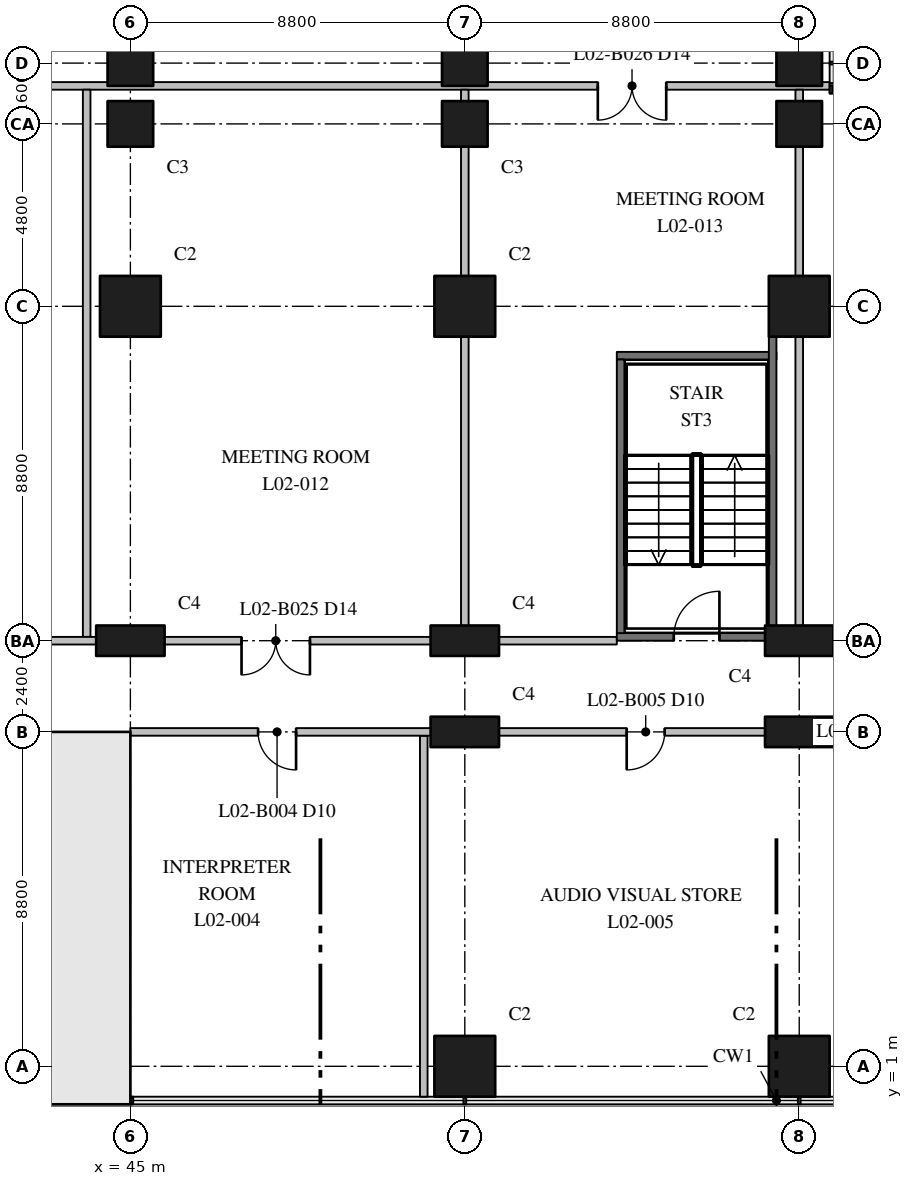
"""IFC4 building model, lengths in metres.
Left out: names, types, materials, properties, quantities, classifications, styles, units other than length and angle.
Written with IfcOpenShell. Run it as: python <this file> out.ifc"""

import sys

from ifc_helpers import new_model, si_unit, direction, frame, frame_2d, origin, origin_2d, place, context, subcontext, project, spatial, rectangle, extrude, element, fill, save


model = new_model("IFC4")
c1 = context("Model", 3, precision=1e-05, world=origin(), true_north=direction((0.0, 1.0)))
c2 = subcontext(c1, "Body", "Model", "MODEL_VIEW")
j1 = project(units=[si_unit("LENGTHUNIT", "METRE"), si_unit("PLANEANGLEUNIT", "RADIAN")], contexts=[c1])
p1 = place(None, origin())
s1 = spatial("IfcSite", under=j1, at=p1, CompositionType="ELEMENT")
p2 = place(p1, origin())
s2 = spatial("IfcBuilding", under=s1, at=p2, CompositionType="ELEMENT")
p3 = place(p2, frame((0.0, 0.0, 13.0)))
s3 = spatial("IfcBuildingStorey", under=s2, at=p3, CompositionType="ELEMENT", Elevation=13.0)
p4 = place(p3, frame((45.0, 12.2, 0.0), z_axis=(0.0, 0.0, 1.0), x_axis=(1.0, 0.0, 0.0)))
e1 = element("IfcColumn", 1, at=p4, inside=s3, PredefinedType="COLUMN", context=c2, shape_type="SweptSolid", body=[
    extrude(rectangle(XDim=1.8, YDim=0.8, at=origin_2d()), origin(), (0.0, 0.0, 1.0), 5.0),
])
p5 = place(p3, frame((45.0, 21.0, 0.0), z_axis=(0.0, 0.0, 1.0), x_axis=(1.0, 0.0, 0.0)))
e2 = element("IfcColumn", 2, at=p5, inside=s3, PredefinedType="COLUMN", context=c2, shape_type="SweptSolid", body=[
    extrude(rectangle(XDim=1.6, YDim=1.6, at=origin_2d()), origin(), (0.0, 0.0, 1.0), 5.0),
])
p6 = place(p3, frame((45.0, 25.8, 0.0), z_axis=(0.0, 0.0, 1.0), x_axis=(1.0, 0.0, 0.0)))
e3 = element("IfcColumn", 3, at=p6, inside=s3, PredefinedType="COLUMN", context=c2, shape_type="SweptSolid", body=[
    extrude(rectangle(XDim=1.2, YDim=1.2, at=origin_2d()), origin(), (0.0, 0.0, 1.0), 5.0),
])
p7 = place(p3, frame((53.8, 1.0, 0.0), z_axis=(0.0, 0.0, 1.0), x_axis=(1.0, 0.0, 0.0)))
e4 = element("IfcColumn", 4, at=p7, inside=s3, PredefinedType="COLUMN", context=c2, shape_type="SweptSolid", body=[
    extrude(rectangle(XDim=1.6, YDim=1.6, at=origin_2d()), origin(), (0.0, 0.0, 1.0), 5.0),
])
for number, where, z_axis, x_axis in (
    (5, (53.8, 9.8, 0.0), (0.0, 0.0, 1.0), (1.0, 0.0, 0.0)),
    (6, (53.8, 12.2, 0.0), (0.0, 0.0, 1.0), (1.0, 0.0, 0.0)),
):
    element("IfcColumn", number, at=place(p3, frame(where, z_axis=z_axis, x_axis=x_axis)), inside=s3, PredefinedType="COLUMN", context=c2, shape_type="SweptSolid", body=[
        extrude(rectangle(XDim=1.8, YDim=0.8, at=origin_2d()), origin(), (0.0, 0.0, 1.0), 5.0),
    ])
p8 = place(p3, frame((53.8, 21.0, 0.0), z_axis=(0.0, 0.0, 1.0), x_axis=(1.0, 0.0, 0.0)))
e7 = element("IfcColumn", 7, at=p8, inside=s3, PredefinedType="COLUMN", context=c2, shape_type="SweptSolid", body=[
    extrude(rectangle(XDim=1.6, YDim=1.6, at=origin_2d()), origin(), (0.0, 0.0, 1.0), 5.0),
])
p9 = place(p3, frame((53.8, 25.8, 0.0), z_axis=(0.0, 0.0, 1.0), x_axis=(1.0, 0.0, 0.0)))
e8 = element("IfcColumn", 8, at=p9, inside=s3, PredefinedType="COLUMN", context=c2, shape_type="SweptSolid", body=[
    extrude(rectangle(XDim=1.2, YDim=1.2, at=origin_2d()), origin(), (0.0, 0.0, 1.0), 5.0),
])
p10 = place(p3, frame((62.6, 1.0, 0.0), z_axis=(0.0, 0.0, 1.0), x_axis=(1.0, 0.0, 0.0)))
e9 = element("IfcColumn", 9, at=p10, inside=s3, PredefinedType="COLUMN", context=c2, shape_type="SweptSolid", body=[
    extrude(rectangle(XDim=1.6, YDim=1.6, at=origin_2d()), origin(), (0.0, 0.0, 1.0), 5.0),
])
for number, where, z_axis, x_axis in (
    (10, (62.6, 9.8, 0.0), (0.0, 0.0, 1.0), (1.0, 0.0, 0.0)),
    (11, (62.6, 12.2, 0.0), (0.0, 0.0, 1.0), (1.0, 0.0, 0.0)),
):
    element("IfcColumn", number, at=place(p3, frame(where, z_axis=z_axis, x_axis=x_axis)), inside=s3, PredefinedType="COLUMN", context=c2, shape_type="SweptSolid", body=[
        extrude(rectangle(XDim=1.8, YDim=0.8, at=origin_2d()), origin(), (0.0, 0.0, 1.0), 5.0),
    ])
p11 = place(p3, frame((62.6, 21.0, 0.0), z_axis=(0.0, 0.0, 1.0), x_axis=(1.0, 0.0, 0.0)))
e12 = element("IfcColumn", 12, at=p11, inside=s3, PredefinedType="COLUMN", context=c2, shape_type="SweptSolid", body=[
    extrude(rectangle(XDim=1.6, YDim=1.6, at=origin_2d()), origin(), (0.0, 0.0, 1.0), 5.0),
])
for number, where, z_axis, x_axis in (
    (13, (62.6, 25.8, 0.0), (0.0, 0.0, 1.0), (1.0, 0.0, 0.0)),
    (14, (45.0, 27.4, 0.0), (0.0, 0.0, 1.0), (1.0, 0.0, 0.0)),
    (15, (53.8, 27.4, 0.0), (0.0, 0.0, 1.0), (1.0, 0.0, 0.0)),
    (16, (62.6, 27.4, 0.0), (0.0, 0.0, 1.0), (1.0, 0.0, 0.0)),
):
    element("IfcColumn", number, at=place(p3, frame(where, z_axis=z_axis, x_axis=x_axis)), inside=s3, PredefinedType="COLUMN", context=c2, shape_type="SweptSolid", body=[
        extrude(rectangle(XDim=1.2, YDim=1.2, at=origin_2d()), origin(), (0.0, 0.0, 1.0), 5.0),
    ])
p12 = place(p3, frame((9.8, 0.6, 0.0), z_axis=(0.0, 0.0, 1.0), x_axis=(1.0, 0.0, 0.0)))
e17 = element("IfcWall", 17, at=p12, inside=s3, PredefinedType="SHEAR", context=c2, shape_type="SweptSolid", body=[
    extrude(rectangle(XDim=35.2, YDim=1.2, at=frame_2d((17.6, 0.0))), origin(), (0.0, 0.0, 1.0), 5.0),
])
p13 = place(p3, frame((44.4, 1.2, 0.0), z_axis=(0.0, 0.0, 1.0), x_axis=(0.0, 1.0, 0.0)))
e18 = element("IfcWall", 18, at=p13, inside=s3, PredefinedType="SHEAR", context=c2, shape_type="SweptSolid", body=[
    extrude(rectangle(XDim=8.6, YDim=1.2, at=frame_2d((4.3, 0.0))), origin(), (0.0, 0.0, 1.0), 5.0),
])
p14 = place(p3, frame((40.7, 9.6, 0.0), z_axis=(0.0, 0.0, 1.0), x_axis=(1.0, 0.0, 0.0)))
e19 = element("IfcWall", 19, at=p14, inside=s3, PredefinedType="SHEAR", context=c2, shape_type="SweptSolid", body=[
    extrude(rectangle(XDim=4.3, YDim=0.4, at=frame_2d((2.15, 0.0))), origin(), (0.0, 0.0, 1.0), 5.0),
])
p15 = place(p14, frame((1.05, 0.0, 0.0)))
e20 = element("IfcOpeningElement", 20, at=p15, cuts=e19, PredefinedType="OPENING", context=c2, shape_type="SweptSolid", body=[
    extrude(rectangle(XDim=1.2, YDim=2.1, at=frame_2d((0.6, 1.05))), frame((0.0, 0.21, 0.0), z_axis=(0.0, -1.0, 0.0), x_axis=(1.0, 0.0, 0.0)), (0.0, 0.0, 1.0), 0.42),
])
p16 = place(p3, frame((57.8, 12.3, 0.0), z_axis=(0.0, 0.0, 1.0), x_axis=(1.0, 0.0, 0.0)))
e21 = element("IfcWall", 21, at=p16, inside=s3, PredefinedType="SHEAR", context=c2, shape_type="SweptSolid", body=[
    extrude(rectangle(XDim=4.2, YDim=0.2, at=frame_2d((2.1, 0.0))), origin(), (0.0, 0.0, 1.0), 4.6),
])
p17 = place(p16, frame((1.5, 0.0, 0.0)))
e22 = element("IfcOpeningElement", 22, at=p17, cuts=e21, PredefinedType="OPENING", context=c2, shape_type="SweptSolid", body=[
    extrude(rectangle(XDim=1.2, YDim=2.1, at=frame_2d((0.6, 1.05))), frame((0.0, 0.11, 0.0), z_axis=(0.0, -1.0, 0.0), x_axis=(1.0, 0.0, 0.0)), (0.0, 0.0, 1.0), 0.22),
])
p18 = place(p3, frame((57.8, 19.7, 0.0), z_axis=(0.0, 0.0, 1.0), x_axis=(1.0, 0.0, 0.0)))
e23 = element("IfcWall", 23, at=p18, inside=s3, PredefinedType="SHEAR", context=c2, shape_type="SweptSolid", body=[
    extrude(rectangle(XDim=4.2, YDim=0.2, at=frame_2d((2.1, 0.0))), origin(), (0.0, 0.0, 1.0), 4.6),
])
p19 = place(p3, frame((57.9, 12.4, 0.0), z_axis=(0.0, 0.0, 1.0), x_axis=(0.0, 1.0, 0.0)))
e24 = element("IfcWall", 24, at=p19, inside=s3, PredefinedType="SHEAR", context=c2, shape_type="SweptSolid", body=[
    extrude(rectangle(XDim=7.2, YDim=0.2, at=frame_2d((3.6, 0.0))), origin(), (0.0, 0.0, 1.0), 4.6),
])
p20 = place(p3, frame((61.9, 12.4, 0.0), z_axis=(0.0, 0.0, 1.0), x_axis=(0.0, 1.0, 0.0)))
e25 = element("IfcWall", 25, at=p20, inside=s3, PredefinedType="SHEAR", context=c2, shape_type="SweptSolid", body=[
    extrude(rectangle(XDim=7.8, YDim=0.2, at=frame_2d((3.9, 0.0))), origin(), (0.0, 0.0, 1.0), 4.6),
])
p21 = place(p3, frame((45.0, 9.8, 0.0), z_axis=(0.0, 0.0, 1.0), x_axis=(1.0, 0.0, 0.0)))
e26 = element("IfcWall", 26, at=p21, inside=s3, PredefinedType="PARTITIONING", context=c2, shape_type="SweptSolid", body=[
    extrude(rectangle(XDim=19.4, YDim=0.2, at=frame_2d((9.7, 0.0))), origin(), (0.0, 0.0, 1.0), 4.6),
])
p22 = place(p21, frame((3.36, 0.0, 0.0)))
e27 = element("IfcOpeningElement", 27, at=p22, cuts=e26, PredefinedType="OPENING", context=c2, shape_type="SweptSolid", body=[
    extrude(rectangle(XDim=1.0, YDim=2.1, at=frame_2d((0.5, 1.05))), frame((0.0, 0.11, 0.0), z_axis=(0.0, -1.0, 0.0), x_axis=(1.0, 0.0, 0.0)), (0.0, 0.0, 1.0), 0.22),
])
p23 = place(p21, frame((13.06, 0.0, 0.0)))
e28 = element("IfcOpeningElement", 28, at=p23, cuts=e26, PredefinedType="OPENING", context=c2, shape_type="SweptSolid", body=[
    extrude(rectangle(XDim=1.0, YDim=2.1, at=frame_2d((0.5, 1.05))), frame((0.0, 0.11, 0.0), z_axis=(0.0, -1.0, 0.0), x_axis=(1.0, 0.0, 0.0)), (0.0, 0.0, 1.0), 0.22),
])
p24 = place(p3, frame((35.4, 12.2, 0.0), z_axis=(0.0, 0.0, 1.0), x_axis=(1.0, 0.0, 0.0)))
e29 = element("IfcWall", 29, at=p24, inside=s3, PredefinedType="PARTITIONING", context=c2, shape_type="SweptSolid", body=[
    extrude(rectangle(XDim=22.4, YDim=0.2, at=frame_2d((11.2, 0.0))), origin(), (0.0, 0.0, 1.0), 4.6),
])
p25 = place(p24, frame((12.525, 0.0, 0.0)))
e30 = element("IfcOpeningElement", 30, at=p25, cuts=e29, PredefinedType="OPENING", context=c2, shape_type="SweptSolid", body=[
    extrude(rectangle(XDim=1.8, YDim=2.4, at=frame_2d((0.9, 1.2))), frame((0.0, 0.11, 0.0), z_axis=(0.0, -1.0, 0.0), x_axis=(1.0, 0.0, 0.0)), (0.0, 0.0, 1.0), 0.22),
])
p26 = place(p3, frame((62.0, 12.2, 0.0), z_axis=(0.0, 0.0, 1.0), x_axis=(1.0, 0.0, 0.0)))
e31 = element("IfcWall", 31, at=p26, inside=s3, PredefinedType="PARTITIONING", context=c2, shape_type="SweptSolid", body=[
    extrude(rectangle(XDim=4.6, YDim=0.2, at=frame_2d((2.3, 0.0))), origin(), (0.0, 0.0, 1.0), 4.6),
])
p27 = place(p26, frame((2.1, 0.0, 0.0)))
e32 = element("IfcOpeningElement", 32, at=p27, cuts=e31, PredefinedType="OPENING", context=c2, shape_type="SweptSolid", body=[
    extrude(rectangle(XDim=1.0, YDim=2.1, at=frame_2d((0.5, 1.05))), frame((0.0, 0.11, 0.0), z_axis=(0.0, -1.0, 0.0), x_axis=(1.0, 0.0, 0.0)), (0.0, 0.0, 1.0), 0.22),
])
p28 = place(p3, frame((12.1, 26.8, 0.0), z_axis=(0.0, 0.0, 1.0), x_axis=(1.0, 0.0, 0.0)))
e33 = element("IfcWall", 33, at=p28, inside=s3, PredefinedType="PARTITIONING", context=c2, shape_type="SweptSolid", body=[
    extrude(rectangle(XDim=51.3, YDim=0.2, at=frame_2d((25.65, 0.0))), origin(), (0.0, 0.0, 1.0), 4.6),
])
p29 = place(p28, frame((18.0, 0.0, 0.0)))
e34 = element("IfcOpeningElement", 34, at=p29, cuts=e33, PredefinedType="OPENING", context=c2, shape_type="SweptSolid", body=[
    extrude(rectangle(XDim=1.8, YDim=2.4, at=frame_2d((0.9, 1.2))), frame((0.0, 0.11, 0.0), z_axis=(0.0, -1.0, 0.0), x_axis=(1.0, 0.0, 0.0)), (0.0, 0.0, 1.0), 0.22),
])
p30 = place(p28, frame((45.2, 0.0, 0.0)))
e35 = element("IfcOpeningElement", 35, at=p30, cuts=e33, PredefinedType="OPENING", context=c2, shape_type="SweptSolid", body=[
    extrude(rectangle(XDim=1.8, YDim=2.4, at=frame_2d((0.9, 1.2))), frame((0.0, 0.11, 0.0), z_axis=(0.0, -1.0, 0.0), x_axis=(1.0, 0.0, 0.0)), (0.0, 0.0, 1.0), 0.22),
])
p31 = place(p3, frame((52.72, 0.2, 0.0), z_axis=(0.0, 0.0, 1.0), x_axis=(0.0, 1.0, 0.0)))
e36 = element("IfcWall", 36, at=p31, inside=s3, PredefinedType="PARTITIONING", context=c2, shape_type="SweptSolid", body=[
    extrude(rectangle(XDim=9.5, YDim=0.2, at=frame_2d((4.75, 0.0))), origin(), (0.0, 0.0, 1.0), 4.6),
])
for number, where, z_axis, x_axis in (
    (37, (43.85, 12.3, 0.0), (0.0, 0.0, 1.0), (0.0, 1.0, 0.0)),
    (38, (53.8, 12.3, 0.0), (0.0, 0.0, 1.0), (0.0, 1.0, 0.0)),
    (39, (62.6, 12.3, 0.0), (0.0, 0.0, 1.0), (0.0, 1.0, 0.0)),
):
    element("IfcWall", number, at=place(p3, frame(where, z_axis=z_axis, x_axis=x_axis)), inside=s3, PredefinedType="PARTITIONING", context=c2, shape_type="SweptSolid", body=[
        extrude(rectangle(XDim=14.4, YDim=0.2, at=frame_2d((7.2, 0.0))), origin(), (0.0, 0.0, 1.0), 4.6),
    ])
p32 = place(p17, origin())
e40 = element("IfcDoor", 40, at=p32, inside=s3, OperationType="SINGLE_SWING_RIGHT", PredefinedType="DOOR", context=c2, shape_type="SweptSolid", body=[
    extrude(rectangle(XDim=1.2, YDim=2.1, at=frame_2d((0.6, 1.05))), frame((0.0, 0.025, 0.0), z_axis=(0.0, -1.0, 0.0), x_axis=(1.0, 0.0, 0.0)), (0.0, 0.0, 1.0), 0.05),
])
fill(e22, e40)
p33 = place(p22, frame((1.0, 0.0, 0.0), z_axis=(0.0, 0.0, 1.0), x_axis=(-1.0, 0.0, 0.0)))
e41 = element("IfcDoor", 41, at=p33, inside=s3, OperationType="SINGLE_SWING_RIGHT", PredefinedType="DOOR", context=c2, shape_type="SweptSolid", body=[
    extrude(rectangle(XDim=1.0, YDim=2.1, at=frame_2d((0.5, 1.05))), frame((0.0, 0.025, 0.0), z_axis=(0.0, -1.0, 0.0), x_axis=(1.0, 0.0, 0.0)), (0.0, 0.0, 1.0), 0.05),
])
fill(e27, e41)
p34 = place(p23, frame((1.0, 0.0, 0.0), z_axis=(0.0, 0.0, 1.0), x_axis=(-1.0, 0.0, 0.0)))
e42 = element("IfcDoor", 42, at=p34, inside=s3, OperationType="SINGLE_SWING_LEFT", PredefinedType="DOOR", context=c2, shape_type="SweptSolid", body=[
    extrude(rectangle(XDim=1.0, YDim=2.1, at=frame_2d((0.5, 1.05))), frame((0.0, 0.025, 0.0), z_axis=(0.0, -1.0, 0.0), x_axis=(1.0, 0.0, 0.0)), (0.0, 0.0, 1.0), 0.05),
])
fill(e28, e42)
p35 = place(p25, frame((1.8, 0.0, 0.0), z_axis=(0.0, 0.0, 1.0), x_axis=(-1.0, 0.0, 0.0)))
e43 = element("IfcDoor", 43, at=p35, inside=s3, OperationType="DOUBLE_DOOR_SINGLE_SWING", PredefinedType="DOOR", context=c2, shape_type="SweptSolid", body=[
    extrude(rectangle(XDim=1.8, YDim=2.4, at=frame_2d((0.9, 1.2))), frame((0.0, 0.025, 0.0), z_axis=(0.0, -1.0, 0.0), x_axis=(1.0, 0.0, 0.0)), (0.0, 0.0, 1.0), 0.05),
])
fill(e30, e43)
p36 = place(p30, frame((1.8, 0.0, 0.0), z_axis=(0.0, 0.0, 1.0), x_axis=(-1.0, 0.0, 0.0)))
e44 = element("IfcDoor", 44, at=p36, inside=s3, OperationType="DOUBLE_DOOR_SINGLE_SWING", PredefinedType="DOOR", context=c2, shape_type="SweptSolid", body=[
    extrude(rectangle(XDim=1.8, YDim=2.4, at=frame_2d((0.9, 1.2))), frame((0.0, 0.025, 0.0), z_axis=(0.0, -1.0, 0.0), x_axis=(1.0, 0.0, 0.0)), (0.0, 0.0, 1.0), 0.05),
])
fill(e35, e44)
save(model, sys.argv[1])
